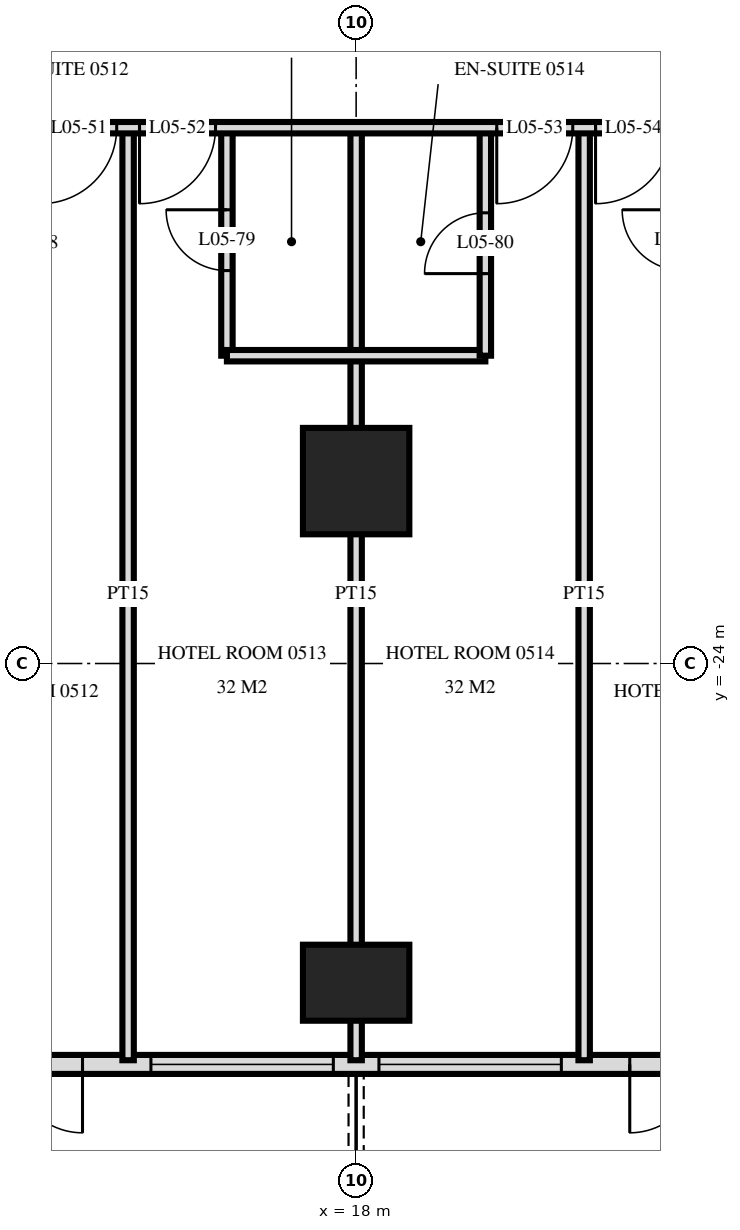
"""IFC4 building model, lengths in metres.
Left out: names, types, materials, properties, quantities, classifications, styles, units other than length and angle.
Written with IfcOpenShell. Run it as: python <this file> out.ifc"""

import sys

from ifc_helpers import new_model, si_unit, direction, frame, frame_2d, origin, origin_2d, place, context, subcontext, project, spatial, rectangle, extrude, element, fill, save


model = new_model("IFC4")
c1 = context("Model", 3, precision=1e-05, world=origin(), true_north=direction((0.0, 1.0)))
c2 = subcontext(c1, "Body", "Model", "MODEL_VIEW")
j1 = project(units=[si_unit("LENGTHUNIT", "METRE"), si_unit("PLANEANGLEUNIT", "RADIAN")], contexts=[c1])
p1 = place(None, origin())
s1 = spatial("IfcSite", under=j1, at=p1, CompositionType="ELEMENT")
p2 = place(p1, origin())
s2 = spatial("IfcBuilding", under=s1, at=p2, CompositionType="ELEMENT")
p3 = place(p2, frame((0.0, 0.0, 27.6)))
s3 = spatial("IfcBuildingStorey", under=s2, at=p3, CompositionType="ELEMENT", Elevation=27.6)
p4 = place(p3, frame((18.0, -28.2, 0.0), z_axis=(0.0, 0.0, 1.0), x_axis=(1.0, 0.0, 0.0)))
e1 = element("IfcColumn", 1, at=p4, inside=s3, PredefinedType="COLUMN", context=c2, shape_type="SweptSolid", body=[
    extrude(rectangle(XDim=1.4, YDim=1.0, at=origin_2d()), origin(), (0.0, 0.0, 1.0), 3.6),
])
p5 = place(p3, frame((18.0, -21.6, 0.0), z_axis=(0.0, 0.0, 1.0), x_axis=(1.0, 0.0, 0.0)))
e2 = element("IfcColumn", 2, at=p5, inside=s3, PredefinedType="COLUMN", context=c2, shape_type="SweptSolid", body=[
    extrude(rectangle(XDim=1.4, YDim=1.4, at=origin_2d()), origin(), (0.0, 0.0, 1.0), 3.6),
])
p6 = place(p3, frame((-28.775, -29.275, 0.0), z_axis=(0.0, 0.0, 1.0), x_axis=(1.0, 0.0, 0.0)))
e3 = element("IfcWall", 3, at=p6, inside=s3, PredefinedType="SOLIDWALL", context=c2, shape_type="SweptSolid", body=[
    extrude(rectangle(XDim=57.551, YDim=0.25, at=frame_2d((28.775, 0.0))), origin(), (0.0, 0.0, 1.0), 3.32),
])
p7 = place(p6, frame((0.575, 0.0, 0.0)))
e4 = element("IfcOpeningElement", 4, at=p7, cuts=e3, PredefinedType="OPENING", context=c2, shape_type="SweptSolid", body=[
    extrude(rectangle(XDim=1.8, YDim=2.4, at=frame_2d((0.9, 1.2))), frame((0.0, 0.135, 0.0), z_axis=(0.0, -1.0, 0.0), x_axis=(1.0, 0.0, 0.0)), (0.0, 0.0, 1.0), 0.27),
])
p8 = place(p6, frame((5.375, 0.0, 0.0)))
e5 = element("IfcOpeningElement", 5, at=p8, cuts=e3, PredefinedType="OPENING", context=c2, shape_type="SweptSolid", body=[
    extrude(rectangle(XDim=1.8, YDim=2.4, at=frame_2d((0.9, 1.2))), frame((0.0, 0.135, 0.0), z_axis=(0.0, -1.0, 0.0), x_axis=(1.0, 0.0, 0.0)), (0.0, 0.0, 1.0), 0.27),
])
p9 = place(p6, frame((8.075, 0.0, 0.3)))
e6 = element("IfcOpeningElement", 6, at=p9, cuts=e3, PredefinedType="OPENING", context=c2, shape_type="SweptSolid", body=[
    extrude(rectangle(XDim=2.4, YDim=2.1, at=frame_2d((1.2, 1.05))), frame((0.0, 0.135, 0.0), z_axis=(0.0, -1.0, 0.0), x_axis=(1.0, 0.0, 0.0)), (0.0, 0.0, 1.0), 0.27),
])
p10 = place(p6, frame((11.375, 0.0, 0.0)))
e7 = element("IfcOpeningElement", 7, at=p10, cuts=e3, PredefinedType="OPENING", context=c2, shape_type="SweptSolid", body=[
    extrude(rectangle(XDim=1.8, YDim=2.4, at=frame_2d((0.9, 1.2))), frame((0.0, 0.135, 0.0), z_axis=(0.0, -1.0, 0.0), x_axis=(1.0, 0.0, 0.0)), (0.0, 0.0, 1.0), 0.27),
])
p11 = place(p6, frame((14.075, 0.0, 0.3)))
e8 = element("IfcOpeningElement", 8, at=p11, cuts=e3, PredefinedType="OPENING", context=c2, shape_type="SweptSolid", body=[
    extrude(rectangle(XDim=2.4, YDim=2.1, at=frame_2d((1.2, 1.05))), frame((0.0, 0.135, 0.0), z_axis=(0.0, -1.0, 0.0), x_axis=(1.0, 0.0, 0.0)), (0.0, 0.0, 1.0), 0.27),
])
p12 = place(p6, frame((17.375, 0.0, 0.0)))
e9 = element("IfcOpeningElement", 9, at=p12, cuts=e3, PredefinedType="OPENING", context=c2, shape_type="SweptSolid", body=[
    extrude(rectangle(XDim=1.8, YDim=2.4, at=frame_2d((0.9, 1.2))), frame((0.0, 0.135, 0.0), z_axis=(0.0, -1.0, 0.0), x_axis=(1.0, 0.0, 0.0)), (0.0, 0.0, 1.0), 0.27),
])
p13 = place(p6, frame((20.075, 0.0, 0.3)))
e10 = element("IfcOpeningElement", 10, at=p13, cuts=e3, PredefinedType="OPENING", context=c2, shape_type="SweptSolid", body=[
    extrude(rectangle(XDim=2.4, YDim=2.1, at=frame_2d((1.2, 1.05))), frame((0.0, 0.135, 0.0), z_axis=(0.0, -1.0, 0.0), x_axis=(1.0, 0.0, 0.0)), (0.0, 0.0, 1.0), 0.27),
])
p14 = place(p6, frame((23.075, 0.0, 0.3)))
e11 = element("IfcOpeningElement", 11, at=p14, cuts=e3, PredefinedType="OPENING", context=c2, shape_type="SweptSolid", body=[
    extrude(rectangle(XDim=2.4, YDim=2.1, at=frame_2d((1.2, 1.05))), frame((0.0, 0.135, 0.0), z_axis=(0.0, -1.0, 0.0), x_axis=(1.0, 0.0, 0.0)), (0.0, 0.0, 1.0), 0.27),
])
p15 = place(p6, frame((26.375, 0.0, 0.0)))
e12 = element("IfcOpeningElement", 12, at=p15, cuts=e3, PredefinedType="OPENING", context=c2, shape_type="SweptSolid", body=[
    extrude(rectangle(XDim=1.8, YDim=2.4, at=frame_2d((0.9, 1.2))), frame((0.0, 0.135, 0.0), z_axis=(0.0, -1.0, 0.0), x_axis=(1.0, 0.0, 0.0)), (0.0, 0.0, 1.0), 0.27),
])
p16 = place(p6, frame((29.375, 0.0, 0.0)))
e13 = element("IfcOpeningElement", 13, at=p16, cuts=e3, PredefinedType="OPENING", context=c2, shape_type="SweptSolid", body=[
    extrude(rectangle(XDim=1.8, YDim=2.4, at=frame_2d((0.9, 1.2))), frame((0.0, 0.135, 0.0), z_axis=(0.0, -1.0, 0.0), x_axis=(1.0, 0.0, 0.0)), (0.0, 0.0, 1.0), 0.27),
])
p17 = place(p6, frame((32.075, 0.0, 0.3)))
e14 = element("IfcOpeningElement", 14, at=p17, cuts=e3, PredefinedType="OPENING", context=c2, shape_type="SweptSolid", body=[
    extrude(rectangle(XDim=2.4, YDim=2.1, at=frame_2d((1.2, 1.05))), frame((0.0, 0.135, 0.0), z_axis=(0.0, -1.0, 0.0), x_axis=(1.0, 0.0, 0.0)), (0.0, 0.0, 1.0), 0.27),
])
p18 = place(p6, frame((35.375, 0.0, 0.0)))
e15 = element("IfcOpeningElement", 15, at=p18, cuts=e3, PredefinedType="OPENING", context=c2, shape_type="SweptSolid", body=[
    extrude(rectangle(XDim=1.8, YDim=2.4, at=frame_2d((0.9, 1.2))), frame((0.0, 0.135, 0.0), z_axis=(0.0, -1.0, 0.0), x_axis=(1.0, 0.0, 0.0)), (0.0, 0.0, 1.0), 0.27),
])
p19 = place(p6, frame((38.075, 0.0, 0.3)))
e16 = element("IfcOpeningElement", 16, at=p19, cuts=e3, PredefinedType="OPENING", context=c2, shape_type="SweptSolid", body=[
    extrude(rectangle(XDim=2.4, YDim=2.1, at=frame_2d((1.2, 1.05))), frame((0.0, 0.135, 0.0), z_axis=(0.0, -1.0, 0.0), x_axis=(1.0, 0.0, 0.0)), (0.0, 0.0, 1.0), 0.27),
])
p20 = place(p6, frame((41.375, 0.0, 0.0)))
e17 = element("IfcOpeningElement", 17, at=p20, cuts=e3, PredefinedType="OPENING", context=c2, shape_type="SweptSolid", body=[
    extrude(rectangle(XDim=1.8, YDim=2.4, at=frame_2d((0.9, 1.2))), frame((0.0, 0.135, 0.0), z_axis=(0.0, -1.0, 0.0), x_axis=(1.0, 0.0, 0.0)), (0.0, 0.0, 1.0), 0.27),
])
p21 = place(p6, frame((44.075, 0.0, 0.3)))
e18 = element("IfcOpeningElement", 18, at=p21, cuts=e3, PredefinedType="OPENING", context=c2, shape_type="SweptSolid", body=[
    extrude(rectangle(XDim=2.4, YDim=2.1, at=frame_2d((1.2, 1.05))), frame((0.0, 0.135, 0.0), z_axis=(0.0, -1.0, 0.0), x_axis=(1.0, 0.0, 0.0)), (0.0, 0.0, 1.0), 0.27),
])
p22 = place(p6, frame((47.075, 0.0, 0.3)))
e19 = element("IfcOpeningElement", 19, at=p22, cuts=e3, PredefinedType="OPENING", context=c2, shape_type="SweptSolid", body=[
    extrude(rectangle(XDim=2.4, YDim=2.1, at=frame_2d((1.2, 1.05))), frame((0.0, 0.135, 0.0), z_axis=(0.0, -1.0, 0.0), x_axis=(1.0, 0.0, 0.0)), (0.0, 0.0, 1.0), 0.27),
])
p23 = place(p6, frame((50.375, 0.0, 0.0)))
e20 = element("IfcOpeningElement", 20, at=p23, cuts=e3, PredefinedType="OPENING", context=c2, shape_type="SweptSolid", body=[
    extrude(rectangle(XDim=1.8, YDim=2.4, at=frame_2d((0.9, 1.2))), frame((0.0, 0.135, 0.0), z_axis=(0.0, -1.0, 0.0), x_axis=(1.0, 0.0, 0.0)), (0.0, 0.0, 1.0), 0.27),
])
p24 = place(p6, frame((53.375, 0.0, 0.0)))
e21 = element("IfcOpeningElement", 21, at=p24, cuts=e3, PredefinedType="OPENING", context=c2, shape_type="SweptSolid", body=[
    extrude(rectangle(XDim=1.8, YDim=2.4, at=frame_2d((0.9, 1.2))), frame((0.0, 0.135, 0.0), z_axis=(0.0, -1.0, 0.0), x_axis=(1.0, 0.0, 0.0)), (0.0, 0.0, 1.0), 0.27),
])
p25 = place(p3, frame((21.0, -29.22, 0.0), z_axis=(0.0, 0.0, 1.0), x_axis=(0.0, 1.0, 0.0)))
e22 = element("IfcWall", 22, at=p25, inside=s3, PredefinedType="PARTITIONING", context=c2, shape_type="SweptSolid", body=[
    extrude(rectangle(XDim=12.27, YDim=0.15, at=frame_2d((6.135, 0.0))), origin(), (0.0, 0.0, 1.0), 3.32),
])
p26 = place(p3, frame((19.7, -19.95, 0.0), z_axis=(0.0, 0.0, 1.0), x_axis=(0.0, 1.0, 0.0)))
e23 = element("IfcWall", 23, at=p26, inside=s3, PredefinedType="PARTITIONING", context=c2, shape_type="SweptSolid", body=[
    extrude(rectangle(XDim=3.0, YDim=0.15, at=frame_2d((1.5, 0.0))), origin(), (0.0, 0.0, 1.0), 3.32),
])
p27 = place(p26, frame((1.08, 0.0, 0.0)))
e24 = element("IfcOpeningElement", 24, at=p27, cuts=e23, PredefinedType="OPENING", context=c2, shape_type="SweptSolid", body=[
    extrude(rectangle(XDim=0.8, YDim=2.1, at=frame_2d((0.4, 1.05))), frame((0.0, 0.085, 0.0), z_axis=(0.0, -1.0, 0.0), x_axis=(1.0, 0.0, 0.0)), (0.0, 0.0, 1.0), 0.17),
])
p28 = place(p3, frame((18.0, -29.22, 0.0), z_axis=(0.0, 0.0, 1.0), x_axis=(0.0, 1.0, 0.0)))
e25 = element("IfcWall", 25, at=p28, inside=s3, PredefinedType="PARTITIONING", context=c2, shape_type="SweptSolid", body=[
    extrude(rectangle(XDim=12.27, YDim=0.15, at=frame_2d((6.135, 0.0))), origin(), (0.0, 0.0, 1.0), 3.32),
])
p29 = place(p3, frame((16.3, -19.95, 0.0), z_axis=(0.0, 0.0, 1.0), x_axis=(0.0, 1.0, 0.0)))
e26 = element("IfcWall", 26, at=p29, inside=s3, PredefinedType="PARTITIONING", context=c2, shape_type="SweptSolid", body=[
    extrude(rectangle(XDim=3.0, YDim=0.15, at=frame_2d((1.5, 0.0))), origin(), (0.0, 0.0, 1.0), 3.32),
])
p30 = place(p29, frame((1.12, 0.0, 0.0)))
e27 = element("IfcOpeningElement", 27, at=p30, cuts=e26, PredefinedType="OPENING", context=c2, shape_type="SweptSolid", body=[
    extrude(rectangle(XDim=0.8, YDim=2.1, at=frame_2d((0.4, 1.05))), frame((0.0, 0.085, 0.0), z_axis=(0.0, -1.0, 0.0), x_axis=(1.0, 0.0, 0.0)), (0.0, 0.0, 1.0), 0.17),
])
p31 = place(p3, frame((15.0, -29.22, 0.0), z_axis=(0.0, 0.0, 1.0), x_axis=(0.0, 1.0, 0.0)))
e28 = element("IfcWall", 28, at=p31, inside=s3, PredefinedType="PARTITIONING", context=c2, shape_type="SweptSolid", body=[
    extrude(rectangle(XDim=12.27, YDim=0.15, at=frame_2d((6.135, 0.0))), origin(), (0.0, 0.0, 1.0), 3.32),
])
p32 = place(p3, frame((16.3, -19.95, 0.0), z_axis=(0.0, 0.0, 1.0), x_axis=(1.0, 0.0, 0.0)))
e29 = element("IfcWall", 29, at=p32, inside=s3, PredefinedType="PARTITIONING", context=c2, shape_type="SweptSolid", body=[
    extrude(rectangle(XDim=3.4, YDim=0.15, at=frame_2d((1.7, 0.0))), origin(), (0.0, 0.0, 1.0), 3.32),
])
p33 = place(p3, frame((-33.12, -16.95, 0.0), z_axis=(0.0, 0.0, 1.0), x_axis=(1.0, 0.0, 0.0)))
e30 = element("IfcWall", 30, at=p33, inside=s3, PredefinedType="PARTITIONING", context=c2, shape_type="SweptSolid", body=[
    extrude(rectangle(XDim=66.24, YDim=0.15, at=frame_2d((33.12, 0.0))), origin(), (0.0, 0.0, 1.0), 3.32),
])
p34 = place(p33, frame((9.27, 0.0, 0.0)))
e31 = element("IfcOpeningElement", 31, at=p34, cuts=e30, PredefinedType="OPENING", context=c2, shape_type="SweptSolid", body=[
    extrude(rectangle(XDim=1.0, YDim=2.1, at=frame_2d((0.5, 1.05))), frame((0.0, 0.085, 0.0), z_axis=(0.0, -1.0, 0.0), x_axis=(1.0, 0.0, 0.0)), (0.0, 0.0, 1.0), 0.17),
])
p35 = place(p33, frame((13.97, 0.0, 0.0)))
e32 = element("IfcOpeningElement", 32, at=p35, cuts=e30, PredefinedType="OPENING", context=c2, shape_type="SweptSolid", body=[
    extrude(rectangle(XDim=1.0, YDim=2.1, at=frame_2d((0.5, 1.05))), frame((0.0, 0.085, 0.0), z_axis=(0.0, -1.0, 0.0), x_axis=(1.0, 0.0, 0.0)), (0.0, 0.0, 1.0), 0.17),
])
p36 = place(p33, frame((15.27, 0.0, 0.0)))
e33 = element("IfcOpeningElement", 33, at=p36, cuts=e30, PredefinedType="OPENING", context=c2, shape_type="SweptSolid", body=[
    extrude(rectangle(XDim=1.0, YDim=2.1, at=frame_2d((0.5, 1.05))), frame((0.0, 0.085, 0.0), z_axis=(0.0, -1.0, 0.0), x_axis=(1.0, 0.0, 0.0)), (0.0, 0.0, 1.0), 0.17),
])
p37 = place(p33, frame((19.97, 0.0, 0.0)))
e34 = element("IfcOpeningElement", 34, at=p37, cuts=e30, PredefinedType="OPENING", context=c2, shape_type="SweptSolid", body=[
    extrude(rectangle(XDim=1.0, YDim=2.1, at=frame_2d((0.5, 1.05))), frame((0.0, 0.085, 0.0), z_axis=(0.0, -1.0, 0.0), x_axis=(1.0, 0.0, 0.0)), (0.0, 0.0, 1.0), 0.17),
])
p38 = place(p33, frame((22.27, 0.0, 0.0)))
e35 = element("IfcOpeningElement", 35, at=p38, cuts=e30, PredefinedType="OPENING", context=c2, shape_type="SweptSolid", body=[
    extrude(rectangle(XDim=1.0, YDim=2.1, at=frame_2d((0.5, 1.05))), frame((0.0, 0.085, 0.0), z_axis=(0.0, -1.0, 0.0), x_axis=(1.0, 0.0, 0.0)), (0.0, 0.0, 1.0), 0.17),
])
p39 = place(p33, frame((28.97, 0.0, 0.0)))
e36 = element("IfcOpeningElement", 36, at=p39, cuts=e30, PredefinedType="OPENING", context=c2, shape_type="SweptSolid", body=[
    extrude(rectangle(XDim=1.0, YDim=2.1, at=frame_2d((0.5, 1.05))), frame((0.0, 0.085, 0.0), z_axis=(0.0, -1.0, 0.0), x_axis=(1.0, 0.0, 0.0)), (0.0, 0.0, 1.0), 0.17),
])
p40 = place(p33, frame((30.27, 0.0, 0.0)))
e37 = element("IfcOpeningElement", 37, at=p40, cuts=e30, PredefinedType="OPENING", context=c2, shape_type="SweptSolid", body=[
    extrude(rectangle(XDim=1.0, YDim=2.1, at=frame_2d((0.5, 1.05))), frame((0.0, 0.085, 0.0), z_axis=(0.0, -1.0, 0.0), x_axis=(1.0, 0.0, 0.0)), (0.0, 0.0, 1.0), 0.17),
])
p41 = place(p33, frame((34.97, 0.0, 0.0)))
e38 = element("IfcOpeningElement", 38, at=p41, cuts=e30, PredefinedType="OPENING", context=c2, shape_type="SweptSolid", body=[
    extrude(rectangle(XDim=1.0, YDim=2.1, at=frame_2d((0.5, 1.05))), frame((0.0, 0.085, 0.0), z_axis=(0.0, -1.0, 0.0), x_axis=(1.0, 0.0, 0.0)), (0.0, 0.0, 1.0), 0.17),
])
p42 = place(p33, frame((36.27, 0.0, 0.0)))
e39 = element("IfcOpeningElement", 39, at=p42, cuts=e30, PredefinedType="OPENING", context=c2, shape_type="SweptSolid", body=[
    extrude(rectangle(XDim=1.0, YDim=2.1, at=frame_2d((0.5, 1.05))), frame((0.0, 0.085, 0.0), z_axis=(0.0, -1.0, 0.0), x_axis=(1.0, 0.0, 0.0)), (0.0, 0.0, 1.0), 0.17),
])
p43 = place(p33, frame((40.97, 0.0, 0.0)))
e40 = element("IfcOpeningElement", 40, at=p43, cuts=e30, PredefinedType="OPENING", context=c2, shape_type="SweptSolid", body=[
    extrude(rectangle(XDim=1.0, YDim=2.1, at=frame_2d((0.5, 1.05))), frame((0.0, 0.085, 0.0), z_axis=(0.0, -1.0, 0.0), x_axis=(1.0, 0.0, 0.0)), (0.0, 0.0, 1.0), 0.17),
])
p44 = place(p33, frame((42.27, 0.0, 0.0)))
e41 = element("IfcOpeningElement", 41, at=p44, cuts=e30, PredefinedType="OPENING", context=c2, shape_type="SweptSolid", body=[
    extrude(rectangle(XDim=1.0, YDim=2.1, at=frame_2d((0.5, 1.05))), frame((0.0, 0.085, 0.0), z_axis=(0.0, -1.0, 0.0), x_axis=(1.0, 0.0, 0.0)), (0.0, 0.0, 1.0), 0.17),
])
p45 = place(p33, frame((46.97, 0.0, 0.0)))
e42 = element("IfcOpeningElement", 42, at=p45, cuts=e30, PredefinedType="OPENING", context=c2, shape_type="SweptSolid", body=[
    extrude(rectangle(XDim=1.0, YDim=2.1, at=frame_2d((0.5, 1.05))), frame((0.0, 0.085, 0.0), z_axis=(0.0, -1.0, 0.0), x_axis=(1.0, 0.0, 0.0)), (0.0, 0.0, 1.0), 0.17),
])
p46 = place(p33, frame((48.27, 0.0, 0.0)))
e43 = element("IfcOpeningElement", 43, at=p46, cuts=e30, PredefinedType="OPENING", context=c2, shape_type="SweptSolid", body=[
    extrude(rectangle(XDim=1.0, YDim=2.1, at=frame_2d((0.5, 1.05))), frame((0.0, 0.085, 0.0), z_axis=(0.0, -1.0, 0.0), x_axis=(1.0, 0.0, 0.0)), (0.0, 0.0, 1.0), 0.17),
])
p47 = place(p33, frame((52.97, 0.0, 0.0)))
e44 = element("IfcOpeningElement", 44, at=p47, cuts=e30, PredefinedType="OPENING", context=c2, shape_type="SweptSolid", body=[
    extrude(rectangle(XDim=1.0, YDim=2.1, at=frame_2d((0.5, 1.05))), frame((0.0, 0.085, 0.0), z_axis=(0.0, -1.0, 0.0), x_axis=(1.0, 0.0, 0.0)), (0.0, 0.0, 1.0), 0.17),
])
p48 = place(p33, frame((54.27, 0.0, 0.0)))
e45 = element("IfcOpeningElement", 45, at=p48, cuts=e30, PredefinedType="OPENING", context=c2, shape_type="SweptSolid", body=[
    extrude(rectangle(XDim=1.0, YDim=2.1, at=frame_2d((0.5, 1.05))), frame((0.0, 0.085, 0.0), z_axis=(0.0, -1.0, 0.0), x_axis=(1.0, 0.0, 0.0)), (0.0, 0.0, 1.0), 0.17),
])
p49 = place(p33, frame((4.4, 0.0, 0.0)))
e46 = element("IfcOpeningElement", 46, at=p49, cuts=e30, PredefinedType="OPENING", context=c2, shape_type="SweptSolid", body=[
    extrude(rectangle(XDim=1.0, YDim=2.1, at=frame_2d((0.5, 1.05))), frame((0.0, 0.085, 0.0), z_axis=(0.0, -1.0, 0.0), x_axis=(1.0, 0.0, 0.0)), (0.0, 0.0, 1.0), 0.17),
])
p50 = place(p33, frame((60.8, 0.0, 0.0)))
e47 = element("IfcOpeningElement", 47, at=p50, cuts=e30, PredefinedType="OPENING", context=c2, shape_type="SweptSolid", body=[
    extrude(rectangle(XDim=1.0, YDim=2.1, at=frame_2d((0.5, 1.05))), frame((0.0, 0.085, 0.0), z_axis=(0.0, -1.0, 0.0), x_axis=(1.0, 0.0, 0.0)), (0.0, 0.0, 1.0), 0.17),
])
p51 = place(p20, frame((0.9, 0.0, 0.0), z_axis=(0.0, 0.0, 1.0), x_axis=(-1.0, 0.0, 0.0)))
e48 = element("IfcDoor", 48, at=p51, inside=s3, OperationType="DOUBLE_DOOR_SINGLE_SWING", PredefinedType="DOOR", context=c2, shape_type="SweptSolid", body=[
    extrude(rectangle(XDim=1.8, YDim=2.4, at=frame_2d((0.0, 1.2))), frame((0.0, -0.025, 0.0), z_axis=(0.0, 1.0, 0.0), x_axis=(-1.0, 0.0, 0.0)), (0.0, 0.0, 1.0), 0.05),
])
fill(e17, e48)
p52 = place(p21, origin())
e49 = element("IfcWindow", 49, at=p52, inside=s3, PartitioningType="SINGLE_PANEL", PredefinedType="WINDOW", context=c2, shape_type="SweptSolid", body=[
    extrude(rectangle(XDim=2.4, YDim=2.1, at=frame_2d((1.2, 1.05))), frame((0.0, 0.03, 0.0), z_axis=(0.0, -1.0, 0.0), x_axis=(1.0, 0.0, 0.0)), (0.0, 0.0, 1.0), 0.06),
])
fill(e18, e49)
p53 = place(p22, origin())
e50 = element("IfcWindow", 50, at=p53, inside=s3, PartitioningType="SINGLE_PANEL", PredefinedType="WINDOW", context=c2, shape_type="SweptSolid", body=[
    extrude(rectangle(XDim=2.4, YDim=2.1, at=frame_2d((1.2, 1.05))), frame((0.0, 0.03, 0.0), z_axis=(0.0, -1.0, 0.0), x_axis=(1.0, 0.0, 0.0)), (0.0, 0.0, 1.0), 0.06),
])
fill(e19, e50)
p54 = place(p23, frame((0.9, 0.0, 0.0), z_axis=(0.0, 0.0, 1.0), x_axis=(-1.0, 0.0, 0.0)))
e51 = element("IfcDoor", 51, at=p54, inside=s3, OperationType="DOUBLE_DOOR_SINGLE_SWING", PredefinedType="DOOR", context=c2, shape_type="SweptSolid", body=[
    extrude(rectangle(XDim=1.8, YDim=2.4, at=frame_2d((0.0, 1.2))), frame((0.0, -0.025, 0.0), z_axis=(0.0, 1.0, 0.0), x_axis=(-1.0, 0.0, 0.0)), (0.0, 0.0, 1.0), 0.05),
])
fill(e20, e51)
p55 = place(p45, frame((0.5, 0.0, 0.0), z_axis=(0.0, 0.0, 1.0), x_axis=(-1.0, 0.0, 0.0)))
e52 = element("IfcDoor", 52, at=p55, inside=s3, OperationType="SINGLE_SWING_LEFT", PredefinedType="DOOR", context=c2, shape_type="SweptSolid", body=[
    extrude(rectangle(XDim=1.0, YDim=2.1, at=frame_2d((0.0, 1.05))), frame((0.0, -0.025, 0.0), z_axis=(0.0, 1.0, 0.0), x_axis=(-1.0, 0.0, 0.0)), (0.0, 0.0, 1.0), 0.05),
])
fill(e42, e52)
p56 = place(p46, frame((0.5, 0.0, 0.0), z_axis=(0.0, 0.0, 1.0), x_axis=(-1.0, 0.0, 0.0)))
e53 = element("IfcDoor", 53, at=p56, inside=s3, OperationType="SINGLE_SWING_LEFT", PredefinedType="DOOR", context=c2, shape_type="SweptSolid", body=[
    extrude(rectangle(XDim=1.0, YDim=2.1, at=frame_2d((0.0, 1.05))), frame((0.0, -0.025, 0.0), z_axis=(0.0, 1.0, 0.0), x_axis=(-1.0, 0.0, 0.0)), (0.0, 0.0, 1.0), 0.05),
])
fill(e43, e53)
p57 = place(p47, frame((0.5, 0.0, 0.0), z_axis=(0.0, 0.0, 1.0), x_axis=(-1.0, 0.0, 0.0)))
e54 = element("IfcDoor", 54, at=p57, inside=s3, OperationType="SINGLE_SWING_LEFT", PredefinedType="DOOR", context=c2, shape_type="SweptSolid", body=[
    extrude(rectangle(XDim=1.0, YDim=2.1, at=frame_2d((0.0, 1.05))), frame((0.0, -0.025, 0.0), z_axis=(0.0, 1.0, 0.0), x_axis=(-1.0, 0.0, 0.0)), (0.0, 0.0, 1.0), 0.05),
])
fill(e44, e54)
p58 = place(p48, frame((0.5, 0.0, 0.0), z_axis=(0.0, 0.0, 1.0), x_axis=(-1.0, 0.0, 0.0)))
e55 = element("IfcDoor", 55, at=p58, inside=s3, OperationType="SINGLE_SWING_LEFT", PredefinedType="DOOR", context=c2, shape_type="SweptSolid", body=[
    extrude(rectangle(XDim=1.0, YDim=2.1, at=frame_2d((0.0, 1.05))), frame((0.0, -0.025, 0.0), z_axis=(0.0, 1.0, 0.0), x_axis=(-1.0, 0.0, 0.0)), (0.0, 0.0, 1.0), 0.05),
])
fill(e45, e55)
p59 = place(p30, origin())
e56 = element("IfcDoor", 56, at=p59, inside=s3, OperationType="SINGLE_SWING_LEFT", PredefinedType="DOOR", context=c2, shape_type="SweptSolid", body=[
    extrude(rectangle(XDim=0.8, YDim=2.1, at=frame_2d((0.4, 1.05))), frame((0.0, 0.025, 0.0), z_axis=(0.0, -1.0, 0.0), x_axis=(1.0, 0.0, 0.0)), (0.0, 0.0, 1.0), 0.05),
])
fill(e27, e56)
p60 = place(p27, origin())
e57 = element("IfcDoor", 57, at=p60, inside=s3, OperationType="SINGLE_SWING_RIGHT", PredefinedType="DOOR", context=c2, shape_type="SweptSolid", body=[
    extrude(rectangle(XDim=0.8, YDim=2.1, at=frame_2d((0.4, 1.05))), frame((0.0, 0.025, 0.0), z_axis=(0.0, -1.0, 0.0), x_axis=(1.0, 0.0, 0.0)), (0.0, 0.0, 1.0), 0.05),
])
fill(e24, e57)
save(model, sys.argv[1])
